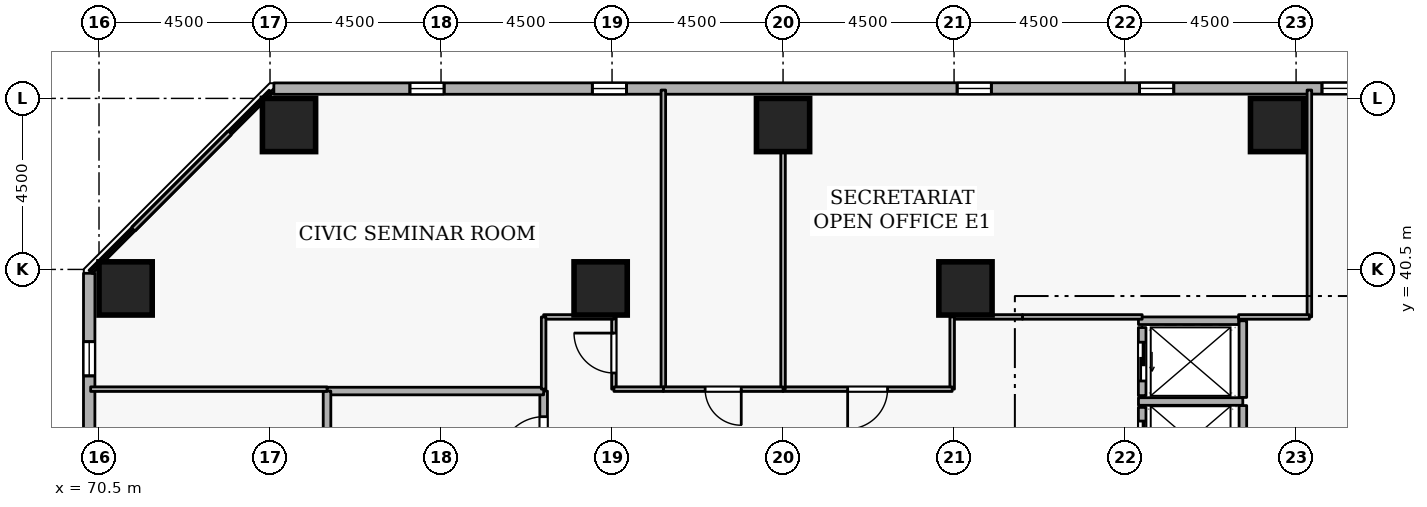
"""IFC4 building model, lengths in metres.
Left out: names, types, materials, properties, quantities, classifications, styles, units other than length and angle.
Written with IfcOpenShell. Run it as: python <this file> out.ifc"""

import sys

from ifc_helpers import new_model, si_unit, direction, frame, frame_2d, origin, origin_2d, place, context, subcontext, project, spatial, rectangle, extrude, element, fill, save


model = new_model("IFC4")
c1 = context("Model", 3, precision=1e-05, world=origin(), true_north=direction((0.0, 1.0)))
c2 = subcontext(c1, "Body", "Model", "MODEL_VIEW")
j1 = project(units=[si_unit("LENGTHUNIT", "METRE"), si_unit("PLANEANGLEUNIT", "RADIAN")], contexts=[c1])
p1 = place(None, origin())
s1 = spatial("IfcSite", under=j1, at=p1, CompositionType="ELEMENT")
p2 = place(p1, origin())
s2 = spatial("IfcBuilding", under=s1, at=p2, CompositionType="ELEMENT")
p3 = place(p2, frame((0.0, 0.0, 42.3)))
s3 = spatial("IfcBuildingStorey", under=s2, at=p3, CompositionType="ELEMENT", Elevation=42.3)
for number, where, z_axis, x_axis in (
    (1, (101.5, 44.3, 0.0), (0.0, 0.0, 1.0), (1.0, 0.0, 0.0)),
    (2, (88.5, 44.3, 0.0), (0.0, 0.0, 1.0), (1.0, 0.0, 0.0)),
    (3, (75.5, 44.3, 0.0), (0.0, 0.0, 1.0), (1.0, 0.0, 0.0)),
    (4, (71.2, 40.0, 0.0), (0.0, 0.0, 1.0), (1.0, 0.0, 0.0)),
    (5, (93.3, 40.0, 0.0), (0.0, 0.0, 1.0), (1.0, 0.0, 0.0)),
    (6, (83.7, 40.0, 0.0), (0.0, 0.0, 1.0), (1.0, 0.0, 0.0)),
):
    element("IfcColumn", number, at=place(p3, frame(where, z_axis=z_axis, x_axis=x_axis)), inside=s3, PredefinedType="COLUMN", context=c2, shape_type="SweptSolid", body=[
        extrude(rectangle(XDim=1.4, YDim=1.4, at=origin_2d()), origin(), (0.0, 0.0, 1.0), 3.6),
    ])
p4 = place(p3, frame((110.181, 45.265, 0.0), z_axis=(0.0, 0.0, 1.0), x_axis=(-0.999999978205, -0.000208784245, 0.0)))
e7 = element("IfcWall", 7, at=p4, inside=s3, PredefinedType="STANDARD", context=c2, shape_type="SweptSolid", body=[
    extrude(rectangle(XDim=35.08, YDim=0.3, at=frame_2d((17.54, 0.0))), origin(), (0.0, 0.0, 1.0), 2.7),
])
p5 = place(p4, frame((1.8, 0.0, 0.72)))
e8 = element("IfcOpeningElement", 8, at=p5, cuts=e7, PredefinedType="OPENING", context=c2, shape_type="SweptSolid", body=[
    extrude(rectangle(XDim=0.9, YDim=1.75, at=frame_2d((0.45, 0.875))), frame((0.0, 0.16, 0.0), z_axis=(0.0, -1.0, 0.0), x_axis=(1.0, 0.0, 0.0)), (0.0, 0.0, 1.0), 0.32),
])
p6 = place(p4, frame((6.6, 0.0, 0.72)))
e9 = element("IfcOpeningElement", 9, at=p6, cuts=e7, PredefinedType="OPENING", context=c2, shape_type="SweptSolid", body=[
    extrude(rectangle(XDim=0.9, YDim=1.75, at=frame_2d((0.45, 0.875))), frame((0.0, 0.16, 0.0), z_axis=(0.0, -1.0, 0.0), x_axis=(1.0, 0.0, 0.0)), (0.0, 0.0, 1.0), 0.32),
])
p7 = place(p4, frame((11.4, 0.0, 0.72)))
e10 = element("IfcOpeningElement", 10, at=p7, cuts=e7, PredefinedType="OPENING", context=c2, shape_type="SweptSolid", body=[
    extrude(rectangle(XDim=0.9, YDim=1.75, at=frame_2d((0.45, 0.875))), frame((0.0, 0.16, 0.0), z_axis=(0.0, -1.0, 0.0), x_axis=(1.0, 0.0, 0.0)), (0.0, 0.0, 1.0), 0.32),
])
p8 = place(p4, frame((16.2, 0.0, 0.72)))
e11 = element("IfcOpeningElement", 11, at=p8, cuts=e7, PredefinedType="OPENING", context=c2, shape_type="SweptSolid", body=[
    extrude(rectangle(XDim=0.9, YDim=1.75, at=frame_2d((0.45, 0.875))), frame((0.0, 0.16, 0.0), z_axis=(0.0, -1.0, 0.0), x_axis=(1.0, 0.0, 0.0)), (0.0, 0.0, 1.0), 0.32),
])
p9 = place(p4, frame((25.8, 0.0, 0.72)))
e12 = element("IfcOpeningElement", 12, at=p9, cuts=e7, PredefinedType="OPENING", context=c2, shape_type="SweptSolid", body=[
    extrude(rectangle(XDim=0.9, YDim=1.75, at=frame_2d((0.45, 0.875))), frame((0.0, 0.16, 0.0), z_axis=(0.0, -1.0, 0.0), x_axis=(1.0, 0.0, 0.0)), (0.0, 0.0, 1.0), 0.32),
])
p10 = place(p4, frame((30.6, 0.0, 0.72)))
e13 = element("IfcOpeningElement", 13, at=p10, cuts=e7, PredefinedType="OPENING", context=c2, shape_type="SweptSolid", body=[
    extrude(rectangle(XDim=0.9, YDim=1.75, at=frame_2d((0.45, 0.875))), frame((0.0, 0.16, 0.0), z_axis=(0.0, -1.0, 0.0), x_axis=(1.0, 0.0, 0.0)), (0.0, 0.0, 1.0), 0.32),
])
p11 = place(p3, frame((70.242, 40.399, 0.0), z_axis=(0.0, 0.0, 1.0), x_axis=(-0.000208784245, -0.999999978205, 0.0)))
e14 = element("IfcWall", 14, at=p11, inside=s3, PredefinedType="STANDARD", context=c2, shape_type="SweptSolid", body=[
    extrude(rectangle(XDim=35.08, YDim=0.3, at=frame_2d((17.54, 0.0))), origin(), (0.0, 0.0, 1.0), 2.7),
])
p12 = place(p11, frame((1.8, 0.0, 0.72)))
e15 = element("IfcOpeningElement", 15, at=p12, cuts=e14, PredefinedType="OPENING", context=c2, shape_type="SweptSolid", body=[
    extrude(rectangle(XDim=0.9, YDim=1.75, at=frame_2d((0.45, 0.875))), frame((0.0, 0.16, 0.0), z_axis=(0.0, -1.0, 0.0), x_axis=(1.0, 0.0, 0.0)), (0.0, 0.0, 1.0), 0.32),
])
p13 = place(p11, frame((6.6, 0.0, 0.72)))
e16 = element("IfcOpeningElement", 16, at=p13, cuts=e14, PredefinedType="OPENING", context=c2, shape_type="SweptSolid", body=[
    extrude(rectangle(XDim=0.9, YDim=1.75, at=frame_2d((0.45, 0.875))), frame((0.0, 0.16, 0.0), z_axis=(0.0, -1.0, 0.0), x_axis=(1.0, 0.0, 0.0)), (0.0, 0.0, 1.0), 0.32),
])
p14 = place(p11, frame((11.4, 0.0, 0.72)))
e17 = element("IfcOpeningElement", 17, at=p14, cuts=e14, PredefinedType="OPENING", context=c2, shape_type="SweptSolid", body=[
    extrude(rectangle(XDim=0.9, YDim=1.75, at=frame_2d((0.45, 0.875))), frame((0.0, 0.16, 0.0), z_axis=(0.0, -1.0, 0.0), x_axis=(1.0, 0.0, 0.0)), (0.0, 0.0, 1.0), 0.32),
])
p15 = place(p11, frame((16.2, 0.0, 0.72)))
e18 = element("IfcOpeningElement", 18, at=p15, cuts=e14, PredefinedType="OPENING", context=c2, shape_type="SweptSolid", body=[
    extrude(rectangle(XDim=0.9, YDim=1.75, at=frame_2d((0.45, 0.875))), frame((0.0, 0.16, 0.0), z_axis=(0.0, -1.0, 0.0), x_axis=(1.0, 0.0, 0.0)), (0.0, 0.0, 1.0), 0.32),
])
p16 = place(p11, frame((21.0, 0.0, 0.72)))
e19 = element("IfcOpeningElement", 19, at=p16, cuts=e14, PredefinedType="OPENING", context=c2, shape_type="SweptSolid", body=[
    extrude(rectangle(XDim=0.9, YDim=1.75, at=frame_2d((0.45, 0.875))), frame((0.0, 0.16, 0.0), z_axis=(0.0, -1.0, 0.0), x_axis=(1.0, 0.0, 0.0)), (0.0, 0.0, 1.0), 0.32),
])
p17 = place(p11, frame((30.6, 0.0, 0.72)))
e20 = element("IfcOpeningElement", 20, at=p17, cuts=e14, PredefinedType="OPENING", context=c2, shape_type="SweptSolid", body=[
    extrude(rectangle(XDim=0.9, YDim=1.75, at=frame_2d((0.45, 0.875))), frame((0.0, 0.16, 0.0), z_axis=(0.0, -1.0, 0.0), x_axis=(1.0, 0.0, 0.0)), (0.0, 0.0, 1.0), 0.32),
])
p18 = place(p3, frame((97.95, 36.87, 0.0), z_axis=(0.0, 0.0, 1.0), x_axis=(0.0, -1.0, 0.0)))
e21 = element("IfcWall", 21, at=p18, inside=s3, PredefinedType="STANDARD", context=c2, shape_type="SweptSolid", body=[
    extrude(rectangle(XDim=1.74, YDim=0.2, at=frame_2d((0.87, 0.0))), origin(), (0.0, 0.0, 1.0), 3.34),
])
p19 = place(p18, frame((0.36, 0.0, 0.0)))
e22 = element("IfcOpeningElement", 22, at=p19, cuts=e21, PredefinedType="OPENING", context=c2, shape_type="SweptSolid", body=[
    extrude(rectangle(XDim=1.02, YDim=2.06, at=frame_2d((0.51, 1.03))), frame((0.0, 0.11, 0.0), z_axis=(0.0, -1.0, 0.0), x_axis=(1.0, 0.0, 0.0)), (0.0, 0.0, 1.0), 0.22),
])
p20 = place(p3, frame((97.95, 38.97, 0.0), z_axis=(0.0, 0.0, 1.0), x_axis=(0.0, -1.0, 0.0)))
e23 = element("IfcWall", 23, at=p20, inside=s3, PredefinedType="STANDARD", context=c2, shape_type="SweptSolid", body=[
    extrude(rectangle(XDim=1.79, YDim=0.2, at=frame_2d((0.895, 0.0))), origin(), (0.0, 0.0, 1.0), 3.34),
])
p21 = place(p20, frame((0.385, 0.0, 0.0)))
e24 = element("IfcOpeningElement", 24, at=p21, cuts=e23, PredefinedType="OPENING", context=c2, shape_type="SweptSolid", body=[
    extrude(rectangle(XDim=1.02, YDim=2.06, at=frame_2d((0.51, 1.03))), frame((0.0, 0.11, 0.0), z_axis=(0.0, -1.0, 0.0), x_axis=(1.0, 0.0, 0.0)), (0.0, 0.0, 1.0), 0.22),
])
p22 = place(p3, frame((97.852, 37.025, 0.0), z_axis=(0.0, 0.0, 1.0), x_axis=(1.0, 0.0, 0.0)))
e25 = element("IfcWall", 25, at=p22, inside=s3, PredefinedType="STANDARD", context=c2, shape_type="SweptSolid", body=[
    extrude(rectangle(XDim=2.746, YDim=0.2, at=frame_2d((1.373, 0.0))), origin(), (0.0, 0.0, 1.0), 3.34),
])
p23 = place(p3, frame((100.6, 35.062, 0.0), z_axis=(0.0, 0.0, 1.0), x_axis=(0.0, 1.0, 0.0)))
e26 = element("IfcWall", 26, at=p23, inside=s3, PredefinedType="STANDARD", context=c2, shape_type="SweptSolid", body=[
    extrude(rectangle(XDim=1.856, YDim=0.2, at=frame_2d((0.928, 0.0))), origin(), (0.0, 0.0, 1.0), 3.34),
])
p24 = place(p3, frame((100.6, 37.132, 0.0), z_axis=(0.0, 0.0, 1.0), x_axis=(0.0, 1.0, 0.0)))
e27 = element("IfcWall", 27, at=p24, inside=s3, PredefinedType="STANDARD", context=c2, shape_type="SweptSolid", body=[
    extrude(rectangle(XDim=2.016, YDim=0.2, at=frame_2d((1.008, 0.0))), origin(), (0.0, 0.0, 1.0), 3.34),
])
p25 = place(p3, frame((97.852, 39.15, 0.0), z_axis=(0.0, 0.0, 1.0), x_axis=(1.0, 0.0, 0.0)))
e28 = element("IfcWall", 28, at=p25, inside=s3, PredefinedType="STANDARD", context=c2, shape_type="SweptSolid", body=[
    extrude(rectangle(XDim=2.636, YDim=0.2, at=frame_2d((1.318, 0.0))), origin(), (0.0, 0.0, 1.0), 3.34),
])
p26 = place(p3, frame((82.2, 34.8, 0.0), z_axis=(0.0, 0.0, 1.0), x_axis=(0.0, 1.0, 0.0)))
e29 = element("IfcWall", 29, at=p26, inside=s3, PredefinedType="STANDARD", context=c2, shape_type="SweptSolid", body=[
    extrude(rectangle(XDim=2.5, YDim=0.2, at=frame_2d((1.25, 0.0))), origin(), (0.0, 0.0, 1.0), 3.34),
])
p27 = place(p26, frame((0.675, 0.0, 0.0)))
e30 = element("IfcOpeningElement", 30, at=p27, cuts=e29, PredefinedType="OPENING", context=c2, shape_type="SweptSolid", body=[
    extrude(rectangle(XDim=1.15, YDim=2.1, at=frame_2d((0.575, 1.05))), frame((0.0, 0.11, 0.0), z_axis=(0.0, -1.0, 0.0), x_axis=(1.0, 0.0, 0.0)), (0.0, 0.0, 1.0), 0.22),
])
p28 = place(p3, frame((82.2, 37.3, 0.0), z_axis=(0.0, 0.0, 1.0), x_axis=(-1.0, 0.0, 0.0)))
e31 = element("IfcWall", 31, at=p28, inside=s3, PredefinedType="STANDARD", context=c2, shape_type="SweptSolid", body=[
    extrude(rectangle(XDim=5.7, YDim=0.2, at=frame_2d((2.85, 0.0))), origin(), (0.0, 0.0, 1.0), 3.34),
])
p29 = place(p3, frame((76.5, 37.3, 0.0), z_axis=(0.0, 0.0, 1.0), x_axis=(0.0, -1.0, 0.0)))
e32 = element("IfcWall", 32, at=p29, inside=s3, PredefinedType="STANDARD", context=c2, shape_type="SweptSolid", body=[
    extrude(rectangle(XDim=2.5, YDim=0.2, at=frame_2d((1.25, 0.0))), origin(), (0.0, 0.0, 1.0), 3.34),
])
p30 = place(p3, frame((97.95, 39.25, 0.0), z_axis=(0.0, 0.0, 1.0), x_axis=(-1.0, 0.0, 0.0)))
e33 = element("IfcWall", 33, at=p30, inside=s3, PredefinedType="PARTITIONING", context=c2, shape_type="SweptSolid", body=[
    extrude(rectangle(XDim=3.15, YDim=0.12, at=frame_2d((1.575, 0.0))), origin(), (0.0, 0.0, 1.0), 3.34),
])
p31 = place(p3, frame((94.8, 39.25, 0.0), z_axis=(0.0, 0.0, 1.0), x_axis=(-1.0, 0.0, 0.0)))
e34 = element("IfcWall", 34, at=p31, inside=s3, PredefinedType="PARTITIONING", context=c2, shape_type="SweptSolid", body=[
    extrude(rectangle(XDim=1.85, YDim=0.12, at=frame_2d((0.925, 0.0))), origin(), (0.0, 0.0, 1.0), 3.34),
])
p32 = place(p3, frame((92.95, 39.25, 0.0), z_axis=(0.0, 0.0, 1.0), x_axis=(0.0, -1.0, 0.0)))
e35 = element("IfcWall", 35, at=p32, inside=s3, PredefinedType="PARTITIONING", context=c2, shape_type="SweptSolid", body=[
    extrude(rectangle(XDim=1.9, YDim=0.12, at=frame_2d((0.95, 0.0))), origin(), (0.0, 0.0, 1.0), 3.34),
])
p33 = place(p3, frame((92.95, 37.35, 0.0), z_axis=(0.0, 0.0, 1.0), x_axis=(-1.0, 0.0, 0.0)))
e36 = element("IfcWall", 36, at=p33, inside=s3, PredefinedType="PARTITIONING", context=c2, shape_type="SweptSolid", body=[
    extrude(rectangle(XDim=4.45, YDim=0.12, at=frame_2d((2.225, 0.0))), origin(), (0.0, 0.0, 1.0), 3.34),
])
p34 = place(p33, frame((1.7, 0.0, 0.0)))
e37 = element("IfcOpeningElement", 37, at=p34, cuts=e36, PredefinedType="OPENING", context=c2, shape_type="SweptSolid", body=[
    extrude(rectangle(XDim=1.05, YDim=2.1, at=frame_2d((0.525, 1.05))), frame((0.0, 0.07, 0.0), z_axis=(0.0, -1.0, 0.0), x_axis=(1.0, 0.0, 0.0)), (0.0, 0.0, 1.0), 0.14),
])
p35 = place(p3, frame((88.5, 37.35, 0.0), z_axis=(0.0, 0.0, 1.0), x_axis=(0.0, 1.0, 0.0)))
e38 = element("IfcWall", 38, at=p35, inside=s3, PredefinedType="PARTITIONING", context=c2, shape_type="SweptSolid", body=[
    extrude(rectangle(XDim=6.95, YDim=0.12, at=frame_2d((3.475, 0.0))), origin(), (0.0, 0.0, 1.0), 2.882),
])
p36 = place(p3, frame((102.35, 45.22, 0.0), z_axis=(0.0, 0.0, 1.0), x_axis=(0.0, -1.0, 0.0)))
e39 = element("IfcWall", 39, at=p36, inside=s3, PredefinedType="PARTITIONING", context=c2, shape_type="SweptSolid", body=[
    extrude(rectangle(XDim=5.97, YDim=0.12, at=frame_2d((2.985, 0.0))), origin(), (0.0, 0.0, 1.0), 3.34),
])
p37 = place(p3, frame((102.35, 39.25, 0.0), z_axis=(0.0, 0.0, 1.0), x_axis=(-1.0, 0.0, 0.0)))
e40 = element("IfcWall", 40, at=p37, inside=s3, PredefinedType="PARTITIONING", context=c2, shape_type="SweptSolid", body=[
    extrude(rectangle(XDim=1.862, YDim=0.12, at=frame_2d((0.931, 0.0))), origin(), (0.0, 0.0, 1.0), 3.34),
])
p38 = place(p3, frame((85.35, 37.35, 0.0), z_axis=(0.0, 0.0, 1.0), x_axis=(0.0, 1.0, 0.0)))
e41 = element("IfcWall", 41, at=p38, inside=s3, PredefinedType="PARTITIONING", context=c2, shape_type="SweptSolid", body=[
    extrude(rectangle(XDim=7.87, YDim=0.12, at=frame_2d((3.935, 0.0))), origin(), (0.0, 0.0, 1.0), 3.34),
])
p39 = place(p3, frame((88.5, 37.35, 0.0), z_axis=(0.0, 0.0, 1.0), x_axis=(-1.0, 0.0, 0.0)))
e42 = element("IfcWall", 42, at=p39, inside=s3, PredefinedType="PARTITIONING", context=c2, shape_type="SweptSolid", body=[
    extrude(rectangle(XDim=3.15, YDim=0.12, at=frame_2d((1.575, 0.0))), origin(), (0.0, 0.0, 1.0), 3.34),
])
p40 = place(p39, frame((1.1, 0.0, 0.0)))
e43 = element("IfcOpeningElement", 43, at=p40, cuts=e42, PredefinedType="OPENING", context=c2, shape_type="SweptSolid", body=[
    extrude(rectangle(XDim=0.95, YDim=2.1, at=frame_2d((0.475, 1.05))), frame((0.0, 0.07, 0.0), z_axis=(0.0, -1.0, 0.0), x_axis=(1.0, 0.0, 0.0)), (0.0, 0.0, 1.0), 0.14),
])
p41 = place(p3, frame((84.05, 37.35, 0.0), z_axis=(0.0, 0.0, 1.0), x_axis=(0.0, 1.0, 0.0)))
e44 = element("IfcWall", 44, at=p41, inside=s3, PredefinedType="PARTITIONING", context=c2, shape_type="SweptSolid", body=[
    extrude(rectangle(XDim=1.9, YDim=0.12, at=frame_2d((0.95, 0.0))), origin(), (0.0, 0.0, 1.0), 3.34),
])
p42 = place(p41, frame((0.425, 0.0, 0.0)))
e45 = element("IfcOpeningElement", 45, at=p42, cuts=e44, PredefinedType="OPENING", context=c2, shape_type="SweptSolid", body=[
    extrude(rectangle(XDim=1.05, YDim=2.1, at=frame_2d((0.525, 1.05))), frame((0.0, 0.07, 0.0), z_axis=(0.0, -1.0, 0.0), x_axis=(1.0, 0.0, 0.0)), (0.0, 0.0, 1.0), 0.14),
])
p43 = place(p3, frame((84.05, 39.25, 0.0), z_axis=(0.0, 0.0, 1.0), x_axis=(-1.0, 0.0, 0.0)))
e46 = element("IfcWall", 46, at=p43, inside=s3, PredefinedType="PARTITIONING", context=c2, shape_type="SweptSolid", body=[
    extrude(rectangle(XDim=1.85, YDim=0.12, at=frame_2d((0.925, 0.0))), origin(), (0.0, 0.0, 1.0), 3.34),
])
p44 = place(p3, frame((82.2, 39.25, 0.0), z_axis=(0.0, 0.0, 1.0), x_axis=(0.0, -1.0, 0.0)))
e47 = element("IfcWall", 47, at=p44, inside=s3, PredefinedType="PARTITIONING", context=c2, shape_type="SweptSolid", body=[
    extrude(rectangle(XDim=1.9, YDim=0.12, at=frame_2d((0.95, 0.0))), origin(), (0.0, 0.0, 1.0), 3.34),
])
p45 = place(p3, frame((76.5, 37.35, 0.0), z_axis=(0.0, 0.0, 1.0), x_axis=(-1.0, 0.0, 0.0)))
e48 = element("IfcWall", 48, at=p45, inside=s3, PredefinedType="PARTITIONING", context=c2, shape_type="SweptSolid", body=[
    extrude(rectangle(XDim=6.22, YDim=0.12, at=frame_2d((3.11, 0.0))), origin(), (0.0, 0.0, 1.0), 3.34),
])
p46 = place(p3, frame((70.28, 40.434, 0.0), z_axis=(0.0, 0.0, 1.0), x_axis=(0.707106781187, 0.707106781187, 0.0)))
e49 = element("IfcWall", 49, at=p46, inside=s3, PredefinedType="PARTITIONING", context=c2, shape_type="SweptSolid", body=[
    extrude(rectangle(XDim=6.703, YDim=0.12, at=frame_2d((3.352, 0.0))), origin(), (0.0, 0.0, 1.0), 3.34),
])
p47 = place(p3, frame((85.35, 37.35, 0.0), z_axis=(0.0, 0.0, 1.0), x_axis=(-1.0, 0.0, 0.0)))
e50 = element("IfcWall", 50, at=p47, inside=s3, PredefinedType="PARTITIONING", context=c2, shape_type="SweptSolid", body=[
    extrude(rectangle(XDim=1.3, YDim=0.12, at=frame_2d((0.65, 0.0))), origin(), (0.0, 0.0, 1.0), 3.34),
])
p48 = place(p6, origin())
e51 = element("IfcWindow", 51, at=p48, inside=s3, PartitioningType="SINGLE_PANEL", PredefinedType="WINDOW", context=c2, shape_type="SweptSolid", body=[
    extrude(rectangle(XDim=0.9, YDim=1.75, at=frame_2d((0.45, 0.875))), frame((0.0, 0.03, 0.0), z_axis=(0.0, -1.0, 0.0), x_axis=(1.0, 0.0, 0.0)), (0.0, 0.0, 1.0), 0.06),
])
fill(e9, e51)
p49 = place(p7, origin())
e52 = element("IfcWindow", 52, at=p49, inside=s3, PartitioningType="SINGLE_PANEL", PredefinedType="WINDOW", context=c2, shape_type="SweptSolid", body=[
    extrude(rectangle(XDim=0.9, YDim=1.75, at=frame_2d((0.45, 0.875))), frame((0.0, 0.03, 0.0), z_axis=(0.0, -1.0, 0.0), x_axis=(1.0, 0.0, 0.0)), (0.0, 0.0, 1.0), 0.06),
])
fill(e10, e52)
p50 = place(p8, origin())
e53 = element("IfcWindow", 53, at=p50, inside=s3, PartitioningType="SINGLE_PANEL", PredefinedType="WINDOW", context=c2, shape_type="SweptSolid", body=[
    extrude(rectangle(XDim=0.9, YDim=1.75, at=frame_2d((0.45, 0.875))), frame((0.0, 0.03, 0.0), z_axis=(0.0, -1.0, 0.0), x_axis=(1.0, 0.0, 0.0)), (0.0, 0.0, 1.0), 0.06),
])
fill(e11, e53)
p51 = place(p9, origin())
e54 = element("IfcWindow", 54, at=p51, inside=s3, PartitioningType="SINGLE_PANEL", PredefinedType="WINDOW", context=c2, shape_type="SweptSolid", body=[
    extrude(rectangle(XDim=0.9, YDim=1.75, at=frame_2d((0.45, 0.875))), frame((0.0, 0.03, 0.0), z_axis=(0.0, -1.0, 0.0), x_axis=(1.0, 0.0, 0.0)), (0.0, 0.0, 1.0), 0.06),
])
fill(e12, e54)
p52 = place(p10, origin())
e55 = element("IfcWindow", 55, at=p52, inside=s3, PartitioningType="SINGLE_PANEL", PredefinedType="WINDOW", context=c2, shape_type="SweptSolid", body=[
    extrude(rectangle(XDim=0.9, YDim=1.75, at=frame_2d((0.45, 0.875))), frame((0.0, 0.03, 0.0), z_axis=(0.0, -1.0, 0.0), x_axis=(1.0, 0.0, 0.0)), (0.0, 0.0, 1.0), 0.06),
])
fill(e13, e55)
p53 = place(p12, origin())
e56 = element("IfcWindow", 56, at=p53, inside=s3, PartitioningType="SINGLE_PANEL", PredefinedType="WINDOW", context=c2, shape_type="SweptSolid", body=[
    extrude(rectangle(XDim=0.9, YDim=1.75, at=frame_2d((0.45, 0.875))), frame((0.0, 0.03, 0.0), z_axis=(0.0, -1.0, 0.0), x_axis=(1.0, 0.0, 0.0)), (0.0, 0.0, 1.0), 0.06),
])
fill(e15, e56)
p54 = place(p19, origin())
e57 = element("IfcDoor", 57, at=p54, inside=s3, OperationType="SLIDING_TO_LEFT", PredefinedType="DOOR", context=c2, shape_type="SweptSolid", body=[
    extrude(rectangle(XDim=1.02, YDim=2.06, at=frame_2d((0.51, 1.03))), frame((0.0, 0.025, 0.0), z_axis=(0.0, -1.0, 0.0), x_axis=(1.0, 0.0, 0.0)), (0.0, 0.0, 1.0), 0.05),
])
fill(e22, e57)
p55 = place(p21, origin())
e58 = element("IfcDoor", 58, at=p55, inside=s3, OperationType="SLIDING_TO_LEFT", PredefinedType="DOOR", context=c2, shape_type="SweptSolid", body=[
    extrude(rectangle(XDim=1.02, YDim=2.06, at=frame_2d((0.51, 1.03))), frame((0.0, 0.025, 0.0), z_axis=(0.0, -1.0, 0.0), x_axis=(1.0, 0.0, 0.0)), (0.0, 0.0, 1.0), 0.05),
])
fill(e24, e58)
p56 = place(p27, origin())
e59 = element("IfcDoor", 59, at=p56, inside=s3, OperationType="SINGLE_SWING_LEFT", PredefinedType="DOOR", context=c2, shape_type="SweptSolid", body=[
    extrude(rectangle(XDim=1.15, YDim=2.1, at=frame_2d((0.575, 1.05))), frame((0.0, 0.025, 0.0), z_axis=(0.0, -1.0, 0.0), x_axis=(1.0, 0.0, 0.0)), (0.0, 0.0, 1.0), 0.05),
])
fill(e30, e59)
p57 = place(p34, origin())
e60 = element("IfcDoor", 60, at=p57, inside=s3, OperationType="SINGLE_SWING_RIGHT", PredefinedType="DOOR", context=c2, shape_type="SweptSolid", body=[
    extrude(rectangle(XDim=1.05, YDim=2.1, at=frame_2d((0.525, 1.05))), frame((0.0, 0.025, 0.0), z_axis=(0.0, -1.0, 0.0), x_axis=(1.0, 0.0, 0.0)), (0.0, 0.0, 1.0), 0.05),
])
fill(e37, e60)
p58 = place(p40, origin())
e61 = element("IfcDoor", 61, at=p58, inside=s3, OperationType="SINGLE_SWING_LEFT", PredefinedType="DOOR", context=c2, shape_type="SweptSolid", body=[
    extrude(rectangle(XDim=0.95, YDim=2.1, at=frame_2d((0.475, 1.05))), frame((0.0, 0.025, 0.0), z_axis=(0.0, -1.0, 0.0), x_axis=(1.0, 0.0, 0.0)), (0.0, 0.0, 1.0), 0.05),
])
fill(e43, e61)
p59 = place(p42, origin())
e62 = element("IfcDoor", 62, at=p59, inside=s3, OperationType="SINGLE_SWING_RIGHT", PredefinedType="DOOR", context=c2, shape_type="SweptSolid", body=[
    extrude(rectangle(XDim=1.05, YDim=2.1, at=frame_2d((0.525, 1.05))), frame((0.0, 0.025, 0.0), z_axis=(0.0, -1.0, 0.0), x_axis=(1.0, 0.0, 0.0)), (0.0, 0.0, 1.0), 0.05),
])
fill(e45, e62)
save(model, sys.argv[1])
